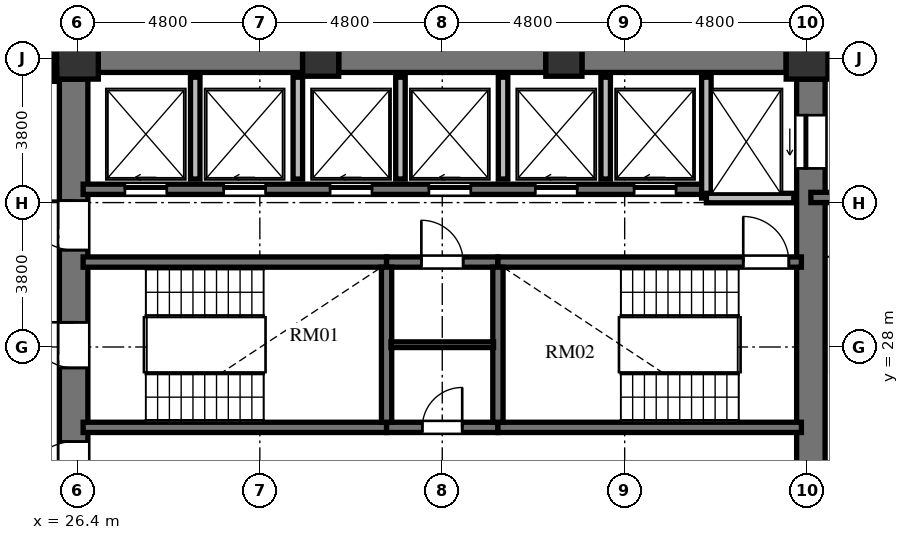
"""IFC4 building model, lengths in metres.
Left out: names, types, materials, properties, quantities, classifications, styles, units other than length and angle.
Written with IfcOpenShell. Run it as: python <this file> out.ifc"""

import sys

from ifc_helpers import new_model, si_unit, direction, frame, frame_2d, origin, origin_2d, place, context, subcontext, project, spatial, rectangle, extrude, element, fill, save


model = new_model("IFC4")
c1 = context("Model", 3, precision=1e-05, world=origin(), true_north=direction((0.0, 1.0)))
c2 = subcontext(c1, "Body", "Model", "MODEL_VIEW")
j1 = project(units=[si_unit("LENGTHUNIT", "METRE"), si_unit("PLANEANGLEUNIT", "RADIAN")], contexts=[c1])
p1 = place(None, origin())
s1 = spatial("IfcSite", under=j1, at=p1, CompositionType="ELEMENT")
p2 = place(p1, origin())
s2 = spatial("IfcBuilding", under=s1, at=p2, CompositionType="ELEMENT")
p3 = place(p2, frame((0.0, 0.0, 125.52)))
s3 = spatial("IfcBuildingStorey", under=s2, at=p3, CompositionType="ELEMENT", Elevation=125.52)
p4 = place(p3, frame((45.6, 35.6, 0.0), z_axis=(0.0, 0.0, 1.0), x_axis=(1.0, 0.0, 0.0)))
e1 = element("IfcColumn", 1, at=p4, inside=s3, PredefinedType="COLUMN", context=c2, shape_type="SweptSolid", body=[
    extrude(rectangle(XDim=1.1, YDim=1.1, at=origin_2d()), origin(), (0.0, 0.0, 1.0), 3.648),
])
for number, where, z_axis, x_axis in (
    (2, (39.2, 35.6, 0.0), (0.0, 0.0, 1.0), (1.0, 0.0, 0.0)),
    (3, (32.8, 35.6, 0.0), (0.0, 0.0, 1.0), (1.0, 0.0, 0.0)),
):
    element("IfcColumn", number, at=place(p3, frame(where, z_axis=z_axis, x_axis=x_axis)), inside=s3, PredefinedType="COLUMN", context=c2, shape_type="SweptSolid", body=[
        extrude(rectangle(XDim=0.95, YDim=0.95, at=origin_2d()), origin(), (0.0, 0.0, 1.0), 3.648),
    ])
p5 = place(p3, frame((26.4, 35.6, 0.0), z_axis=(0.0, 0.0, 1.0), x_axis=(1.0, 0.0, 0.0)))
e4 = element("IfcColumn", 4, at=p5, inside=s3, PredefinedType="COLUMN", context=c2, shape_type="SweptSolid", body=[
    extrude(rectangle(XDim=1.1, YDim=1.1, at=origin_2d()), origin(), (0.0, 0.0, 1.0), 3.648),
])
p6 = place(p3, frame((26.3, 20.95, 0.0), z_axis=(0.0, 0.0, 1.0), x_axis=(0.0, 1.0, 0.0)))
e5 = element("IfcWall", 5, at=p6, inside=s3, PredefinedType="SHEAR", context=c2, shape_type="SweptSolid", body=[
    extrude(rectangle(XDim=14.1, YDim=0.75, at=frame_2d((7.05, 0.0))), origin(), (0.0, 0.0, 1.0), 3.648),
])
p7 = place(p6, frame((6.5, 0.0, 0.0)))
e6 = element("IfcOpeningElement", 6, at=p7, cuts=e5, PredefinedType="OPENING", context=c2, shape_type="SweptSolid", body=[
    extrude(rectangle(XDim=1.2, YDim=2.15, at=frame_2d((0.6, 1.075))), frame((0.0, 0.385, 0.0), z_axis=(0.0, -1.0, 0.0), x_axis=(1.0, 0.0, 0.0)), (0.0, 0.0, 1.0), 0.77),
])
p8 = place(p6, frame((9.6, 0.0, 0.0)))
e7 = element("IfcOpeningElement", 7, at=p8, cuts=e5, PredefinedType="OPENING", context=c2, shape_type="SweptSolid", body=[
    extrude(rectangle(XDim=1.3, YDim=2.2, at=frame_2d((0.65, 1.1))), frame((0.0, 0.385, 0.0), z_axis=(0.0, -1.0, 0.0), x_axis=(1.0, 0.0, 0.0)), (0.0, 0.0, 1.0), 0.77),
])
p9 = place(p6, frame((3.26, 0.0, 0.0)))
e8 = element("IfcOpeningElement", 8, at=p9, cuts=e5, PredefinedType="OPENING", context=c2, shape_type="SweptSolid", body=[
    extrude(rectangle(XDim=1.3, YDim=2.2, at=frame_2d((0.65, 1.1))), frame((0.0, 0.385, 0.0), z_axis=(0.0, -1.0, 0.0), x_axis=(1.0, 0.0, 0.0)), (0.0, 0.0, 1.0), 0.77),
])
p10 = place(p3, frame((45.7, 20.95, 0.0), z_axis=(0.0, 0.0, 1.0), x_axis=(0.0, 1.0, 0.0)))
e9 = element("IfcWall", 9, at=p10, inside=s3, PredefinedType="SHEAR", context=c2, shape_type="SweptSolid", body=[
    extrude(rectangle(XDim=14.1, YDim=0.75, at=frame_2d((7.05, 0.0))), origin(), (0.0, 0.0, 1.0), 3.648),
])
p11 = place(p10, frame((11.75, 0.0, 0.0)))
e10 = element("IfcOpeningElement", 10, at=p11, cuts=e9, PredefinedType="OPENING", context=c2, shape_type="SweptSolid", body=[
    extrude(rectangle(XDim=1.4, YDim=2.3, at=frame_2d((0.7, 1.15))), frame((0.0, 0.385, 0.0), z_axis=(0.0, -1.0, 0.0), x_axis=(1.0, 0.0, 0.0)), (0.0, 0.0, 1.0), 0.77),
])
p12 = place(p10, frame((0.95, 0.0, 0.0)))
e11 = element("IfcOpeningElement", 11, at=p12, cuts=e9, PredefinedType="OPENING", context=c2, shape_type="SweptSolid", body=[
    extrude(rectangle(XDim=1.4, YDim=2.3, at=frame_2d((0.7, 1.15))), frame((0.0, 0.385, 0.0), z_axis=(0.0, -1.0, 0.0), x_axis=(1.0, 0.0, 0.0)), (0.0, 0.0, 1.0), 0.77),
])
p13 = place(p3, frame((26.95, 35.6, 0.0), z_axis=(0.0, 0.0, 1.0), x_axis=(1.0, 0.0, 0.0)))
e12 = element("IfcWall", 12, at=p13, inside=s3, PredefinedType="SHEAR", context=c2, shape_type="SweptSolid", body=[
    extrude(rectangle(XDim=5.375, YDim=0.75, at=frame_2d((2.688, 0.0))), origin(), (0.0, 0.0, 1.0), 3.648),
])
p14 = place(p3, frame((33.275, 35.6, 0.0), z_axis=(0.0, 0.0, 1.0), x_axis=(1.0, 0.0, 0.0)))
e13 = element("IfcWall", 13, at=p14, inside=s3, PredefinedType="SHEAR", context=c2, shape_type="SweptSolid", body=[
    extrude(rectangle(XDim=5.45, YDim=0.75, at=frame_2d((2.725, 0.0))), origin(), (0.0, 0.0, 1.0), 3.648),
])
p15 = place(p3, frame((39.675, 35.6, 0.0), z_axis=(0.0, 0.0, 1.0), x_axis=(1.0, 0.0, 0.0)))
e14 = element("IfcWall", 14, at=p15, inside=s3, PredefinedType="SHEAR", context=c2, shape_type="SweptSolid", body=[
    extrude(rectangle(XDim=5.375, YDim=0.75, at=frame_2d((2.688, 0.0))), origin(), (0.0, 0.0, 1.0), 3.648),
])
p16 = place(p3, frame((26.55, 30.235, 0.0), z_axis=(0.0, 0.0, 1.0), x_axis=(1.0, 0.0, 0.0)))
e15 = element("IfcWall", 15, at=p16, inside=s3, PredefinedType="SHEAR", context=c2, shape_type="SweptSolid", body=[
    extrude(rectangle(XDim=7.985, YDim=0.27, at=frame_2d((3.992, 0.0))), origin(), (0.0, 0.0, 1.0), 3.648),
])
p17 = place(p3, frame((34.535, 30.235, 0.0), z_axis=(0.0, 0.0, 1.0), x_axis=(1.0, 0.0, 0.0)))
e16 = element("IfcWall", 16, at=p17, inside=s3, PredefinedType="SHEAR", context=c2, shape_type="SweptSolid", body=[
    extrude(rectangle(XDim=2.93, YDim=0.27, at=frame_2d((1.465, 0.0))), origin(), (0.0, 0.0, 1.0), 3.648),
])
p18 = place(p17, frame((0.915, 0.0, 0.0)))
e17 = element("IfcOpeningElement", 17, at=p18, cuts=e16, PredefinedType="OPENING", context=c2, shape_type="SweptSolid", body=[
    extrude(rectangle(XDim=1.1, YDim=2.15, at=frame_2d((0.55, 1.075))), frame((0.0, 0.145, 0.0), z_axis=(0.0, -1.0, 0.0), x_axis=(1.0, 0.0, 0.0)), (0.0, 0.0, 1.0), 0.29),
])
p19 = place(p3, frame((37.465, 30.235, 0.0), z_axis=(0.0, 0.0, 1.0), x_axis=(1.0, 0.0, 0.0)))
e18 = element("IfcWall", 18, at=p19, inside=s3, PredefinedType="SHEAR", context=c2, shape_type="SweptSolid", body=[
    extrude(rectangle(XDim=7.985, YDim=0.27, at=frame_2d((3.992, 0.0))), origin(), (0.0, 0.0, 1.0), 3.648),
])
p20 = place(p19, frame((6.455, 0.0, 0.0)))
e19 = element("IfcOpeningElement", 19, at=p20, cuts=e18, PredefinedType="OPENING", context=c2, shape_type="SweptSolid", body=[
    extrude(rectangle(XDim=1.2, YDim=2.15, at=frame_2d((0.6, 1.075))), frame((0.0, 0.145, 0.0), z_axis=(0.0, -1.0, 0.0), x_axis=(1.0, 0.0, 0.0)), (0.0, 0.0, 1.0), 0.29),
])
p21 = place(p3, frame((26.55, 25.885, 0.0), z_axis=(0.0, 0.0, 1.0), x_axis=(1.0, 0.0, 0.0)))
e20 = element("IfcWall", 20, at=p21, inside=s3, PredefinedType="SHEAR", context=c2, shape_type="SweptSolid", body=[
    extrude(rectangle(XDim=7.985, YDim=0.27, at=frame_2d((3.992, 0.0))), origin(), (0.0, 0.0, 1.0), 3.648),
])
p22 = place(p3, frame((34.535, 25.885, 0.0), z_axis=(0.0, 0.0, 1.0), x_axis=(1.0, 0.0, 0.0)))
e21 = element("IfcWall", 21, at=p22, inside=s3, PredefinedType="SHEAR", context=c2, shape_type="SweptSolid", body=[
    extrude(rectangle(XDim=2.93, YDim=0.27, at=frame_2d((1.465, 0.0))), origin(), (0.0, 0.0, 1.0), 3.648),
])
p23 = place(p22, frame((0.94, 0.0, 0.0)))
e22 = element("IfcOpeningElement", 22, at=p23, cuts=e21, PredefinedType="OPENING", context=c2, shape_type="SweptSolid", body=[
    extrude(rectangle(XDim=1.05, YDim=2.15, at=frame_2d((0.525, 1.075))), frame((0.0, 0.145, 0.0), z_axis=(0.0, -1.0, 0.0), x_axis=(1.0, 0.0, 0.0)), (0.0, 0.0, 1.0), 0.29),
])
p24 = place(p3, frame((37.465, 25.885, 0.0), z_axis=(0.0, 0.0, 1.0), x_axis=(1.0, 0.0, 0.0)))
e23 = element("IfcWall", 23, at=p24, inside=s3, PredefinedType="SHEAR", context=c2, shape_type="SweptSolid", body=[
    extrude(rectangle(XDim=7.985, YDim=0.27, at=frame_2d((3.992, 0.0))), origin(), (0.0, 0.0, 1.0), 3.648),
])
for number, where, z_axis, x_axis in (
    (24, (34.535, 26.02, 0.0), (0.0, 0.0, 1.0), (0.0, 1.0, 0.0)),
    (25, (37.465, 26.02, 0.0), (0.0, 0.0, 1.0), (0.0, 1.0, 0.0)),
):
    element("IfcWall", number, at=place(p3, frame(where, z_axis=z_axis, x_axis=x_axis)), inside=s3, PredefinedType="SHEAR", context=c2, shape_type="SweptSolid", body=[
        extrude(rectangle(XDim=4.08, YDim=0.27, at=frame_2d((2.04, 0.0))), origin(), (0.0, 0.0, 1.0), 3.648),
    ])
p25 = place(p3, frame((34.65, 28.06, 0.0), z_axis=(0.0, 0.0, 1.0), x_axis=(1.0, 0.0, 0.0)))
e26 = element("IfcWall", 26, at=p25, inside=s3, PredefinedType="PARTITIONING", context=c2, shape_type="SweptSolid", body=[
    extrude(rectangle(XDim=2.7, YDim=0.15, at=frame_2d((1.35, 0.0))), origin(), (0.0, 0.0, 1.0), 3.428),
])
p26 = place(p3, frame((26.55, 32.15, 0.0), z_axis=(0.0, 0.0, 1.0), x_axis=(1.0, 0.0, 0.0)))
e27 = element("IfcWall", 27, at=p26, inside=s3, PredefinedType="SHEAR", context=c2, shape_type="SweptSolid", body=[
    extrude(rectangle(XDim=16.4, YDim=0.27, at=frame_2d((8.2, 0.0))), origin(), (0.0, 0.0, 1.0), 3.648),
])
p27 = place(p26, frame((1.1, 0.0, 0.0)))
e28 = element("IfcOpeningElement", 28, at=p27, cuts=e27, PredefinedType="OPENING", context=c2, shape_type="SweptSolid", body=[
    extrude(rectangle(XDim=1.1, YDim=2.2, at=frame_2d((0.55, 1.1))), frame((0.0, 0.145, 0.0), z_axis=(0.0, -1.0, 0.0), x_axis=(1.0, 0.0, 0.0)), (0.0, 0.0, 1.0), 0.29),
])
p28 = place(p26, frame((3.7, 0.0, 0.0)))
e29 = element("IfcOpeningElement", 29, at=p28, cuts=e27, PredefinedType="OPENING", context=c2, shape_type="SweptSolid", body=[
    extrude(rectangle(XDim=1.1, YDim=2.2, at=frame_2d((0.55, 1.1))), frame((0.0, 0.145, 0.0), z_axis=(0.0, -1.0, 0.0), x_axis=(1.0, 0.0, 0.0)), (0.0, 0.0, 1.0), 0.29),
])
p29 = place(p26, frame((6.5, 0.0, 0.0)))
e30 = element("IfcOpeningElement", 30, at=p29, cuts=e27, PredefinedType="OPENING", context=c2, shape_type="SweptSolid", body=[
    extrude(rectangle(XDim=1.1, YDim=2.2, at=frame_2d((0.55, 1.1))), frame((0.0, 0.145, 0.0), z_axis=(0.0, -1.0, 0.0), x_axis=(1.0, 0.0, 0.0)), (0.0, 0.0, 1.0), 0.29),
])
p30 = place(p26, frame((9.1, 0.0, 0.0)))
e31 = element("IfcOpeningElement", 31, at=p30, cuts=e27, PredefinedType="OPENING", context=c2, shape_type="SweptSolid", body=[
    extrude(rectangle(XDim=1.1, YDim=2.2, at=frame_2d((0.55, 1.1))), frame((0.0, 0.145, 0.0), z_axis=(0.0, -1.0, 0.0), x_axis=(1.0, 0.0, 0.0)), (0.0, 0.0, 1.0), 0.29),
])
p31 = place(p26, frame((11.9, 0.0, 0.0)))
e32 = element("IfcOpeningElement", 32, at=p31, cuts=e27, PredefinedType="OPENING", context=c2, shape_type="SweptSolid", body=[
    extrude(rectangle(XDim=1.1, YDim=2.2, at=frame_2d((0.55, 1.1))), frame((0.0, 0.145, 0.0), z_axis=(0.0, -1.0, 0.0), x_axis=(1.0, 0.0, 0.0)), (0.0, 0.0, 1.0), 0.29),
])
p32 = place(p26, frame((14.5, 0.0, 0.0)))
e33 = element("IfcOpeningElement", 33, at=p32, cuts=e27, PredefinedType="OPENING", context=c2, shape_type="SweptSolid", body=[
    extrude(rectangle(XDim=1.1, YDim=2.2, at=frame_2d((0.55, 1.1))), frame((0.0, 0.145, 0.0), z_axis=(0.0, -1.0, 0.0), x_axis=(1.0, 0.0, 0.0)), (0.0, 0.0, 1.0), 0.29),
])
p33 = place(p3, frame((42.95, 31.92, 0.0), z_axis=(0.0, 0.0, 1.0), x_axis=(0.0, 1.0, 0.0)))
e34 = element("IfcWall", 34, at=p33, inside=s3, PredefinedType="SOLIDWALL", context=c2, shape_type="SweptSolid", body=[
    extrude(rectangle(XDim=3.18, YDim=0.25, at=frame_2d((1.59, 0.0))), origin(), (0.0, 0.0, 1.0), 3.428),
])
p34 = place(p3, frame((42.95, 31.92, 0.0), z_axis=(0.0, 0.0, 1.0), x_axis=(1.0, 0.0, 0.0)))
e35 = element("IfcWall", 35, at=p34, inside=s3, PredefinedType="SOLIDWALL", context=c2, shape_type="SweptSolid", body=[
    extrude(rectangle(XDim=2.3, YDim=0.25, at=frame_2d((1.15, 0.0))), origin(), (0.0, 0.0, 1.0), 3.428),
])
for number, where, z_axis, x_axis in (
    (36, (29.5, 32.42, 0.0), (0.0, 0.0, 1.0), (0.0, 1.0, 0.0)),
    (37, (32.2, 32.42, 0.0), (0.0, 0.0, 1.0), (0.0, 1.0, 0.0)),
    (38, (34.9, 32.42, 0.0), (0.0, 0.0, 1.0), (0.0, 1.0, 0.0)),
    (39, (37.6, 32.42, 0.0), (0.0, 0.0, 1.0), (0.0, 1.0, 0.0)),
    (40, (40.3, 32.42, 0.0), (0.0, 0.0, 1.0), (0.0, 1.0, 0.0)),
):
    element("IfcWall", number, at=place(p3, frame(where, z_axis=z_axis, x_axis=x_axis)), inside=s3, PredefinedType="SOLIDWALL", context=c2, shape_type="SweptSolid", body=[
        extrude(rectangle(XDim=2.68, YDim=0.25, at=frame_2d((1.34, 0.0))), origin(), (0.0, 0.0, 1.0), 3.428),
    ])
p35 = place(p3, frame((45.7, 31.935, 0.0), z_axis=(0.0, 0.0, 1.0), x_axis=(1.0, 0.0, 0.0)))
e41 = element("IfcWall", 41, at=p35, inside=s3, PredefinedType="SHEAR", context=c2, shape_type="SweptSolid", body=[
    extrude(rectangle(XDim=4.715, YDim=0.27, at=frame_2d((2.357, 0.0))), origin(), (0.0, 0.0, 1.0), 3.648),
])
p36 = place(p3, frame((25.83, 36.21, 0.0), z_axis=(0.0, 0.0, 1.0), x_axis=(0.0, -1.0, 0.0)))
e42 = element("IfcWall", 42, at=p36, inside=s3, PredefinedType="PARTITIONING", context=c2, shape_type="SweptSolid", body=[
    extrude(rectangle(XDim=1.22, YDim=0.18, at=frame_2d((0.61, 0.0))), origin(), (0.0, 0.0, 1.0), 3.428),
])
p37 = place(p7, origin())
e43 = element("IfcDoor", 43, at=p37, inside=s3, OperationType="SINGLE_SWING_RIGHT", PredefinedType="DOOR", context=c2, shape_type="SweptSolid", body=[
    extrude(rectangle(XDim=1.2, YDim=2.15, at=frame_2d((0.6, 1.075))), frame((0.0, 0.025, 0.0), z_axis=(0.0, -1.0, 0.0), x_axis=(1.0, 0.0, 0.0)), (0.0, 0.0, 1.0), 0.05),
])
fill(e6, e43)
p38 = place(p20, origin())
e44 = element("IfcDoor", 44, at=p38, inside=s3, OperationType="SINGLE_SWING_LEFT", PredefinedType="DOOR", context=c2, shape_type="SweptSolid", body=[
    extrude(rectangle(XDim=1.2, YDim=2.15, at=frame_2d((0.6, 1.075))), frame((0.0, 0.025, 0.0), z_axis=(0.0, -1.0, 0.0), x_axis=(1.0, 0.0, 0.0)), (0.0, 0.0, 1.0), 0.05),
])
fill(e19, e44)
p39 = place(p23, origin())
e45 = element("IfcDoor", 45, at=p39, inside=s3, OperationType="SINGLE_SWING_RIGHT", PredefinedType="DOOR", context=c2, shape_type="SweptSolid", body=[
    extrude(rectangle(XDim=1.05, YDim=2.15, at=frame_2d((0.525, 1.075))), frame((0.0, 0.025, 0.0), z_axis=(0.0, -1.0, 0.0), x_axis=(1.0, 0.0, 0.0)), (0.0, 0.0, 1.0), 0.05),
])
fill(e22, e45)
p40 = place(p18, origin())
e46 = element("IfcDoor", 46, at=p40, inside=s3, OperationType="SINGLE_SWING_LEFT", PredefinedType="DOOR", context=c2, shape_type="SweptSolid", body=[
    extrude(rectangle(XDim=1.1, YDim=2.15, at=frame_2d((0.55, 1.075))), frame((0.0, 0.025, 0.0), z_axis=(0.0, -1.0, 0.0), x_axis=(1.0, 0.0, 0.0)), (0.0, 0.0, 1.0), 0.05),
])
fill(e17, e46)
p41 = place(p8, origin())
e47 = element("IfcDoor", 47, at=p41, inside=s3, OperationType="SINGLE_SWING_RIGHT", PredefinedType="DOOR", context=c2, shape_type="SweptSolid", body=[
    extrude(rectangle(XDim=1.3, YDim=2.2, at=frame_2d((0.65, 1.1))), frame((0.0, 0.025, 0.0), z_axis=(0.0, -1.0, 0.0), x_axis=(1.0, 0.0, 0.0)), (0.0, 0.0, 1.0), 0.05),
])
fill(e7, e47)
p42 = place(p9, origin())
e48 = element("IfcDoor", 48, at=p42, inside=s3, OperationType="SINGLE_SWING_LEFT", PredefinedType="DOOR", context=c2, shape_type="SweptSolid", body=[
    extrude(rectangle(XDim=1.3, YDim=2.2, at=frame_2d((0.65, 1.1))), frame((0.0, 0.025, 0.0), z_axis=(0.0, -1.0, 0.0), x_axis=(1.0, 0.0, 0.0)), (0.0, 0.0, 1.0), 0.05),
])
fill(e8, e48)
p43 = place(p27, origin())
e49 = element("IfcDoor", 49, at=p43, inside=s3, OperationType="SLIDING_TO_LEFT", PredefinedType="DOOR", context=c2, shape_type="SweptSolid", body=[
    extrude(rectangle(XDim=1.1, YDim=2.2, at=frame_2d((0.55, 1.1))), frame((0.0, 0.025, 0.0), z_axis=(0.0, -1.0, 0.0), x_axis=(1.0, 0.0, 0.0)), (0.0, 0.0, 1.0), 0.05),
])
fill(e28, e49)
p44 = place(p28, origin())
e50 = element("IfcDoor", 50, at=p44, inside=s3, OperationType="SLIDING_TO_LEFT", PredefinedType="DOOR", context=c2, shape_type="SweptSolid", body=[
    extrude(rectangle(XDim=1.1, YDim=2.2, at=frame_2d((0.55, 1.1))), frame((0.0, 0.025, 0.0), z_axis=(0.0, -1.0, 0.0), x_axis=(1.0, 0.0, 0.0)), (0.0, 0.0, 1.0), 0.05),
])
fill(e29, e50)
p45 = place(p29, origin())
e51 = element("IfcDoor", 51, at=p45, inside=s3, OperationType="SLIDING_TO_LEFT", PredefinedType="DOOR", context=c2, shape_type="SweptSolid", body=[
    extrude(rectangle(XDim=1.1, YDim=2.2, at=frame_2d((0.55, 1.1))), frame((0.0, 0.025, 0.0), z_axis=(0.0, -1.0, 0.0), x_axis=(1.0, 0.0, 0.0)), (0.0, 0.0, 1.0), 0.05),
])
fill(e30, e51)
p46 = place(p30, origin())
e52 = element("IfcDoor", 52, at=p46, inside=s3, OperationType="SLIDING_TO_LEFT", PredefinedType="DOOR", context=c2, shape_type="SweptSolid", body=[
    extrude(rectangle(XDim=1.1, YDim=2.2, at=frame_2d((0.55, 1.1))), frame((0.0, 0.025, 0.0), z_axis=(0.0, -1.0, 0.0), x_axis=(1.0, 0.0, 0.0)), (0.0, 0.0, 1.0), 0.05),
])
fill(e31, e52)
p47 = place(p31, origin())
e53 = element("IfcDoor", 53, at=p47, inside=s3, OperationType="SLIDING_TO_LEFT", PredefinedType="DOOR", context=c2, shape_type="SweptSolid", body=[
    extrude(rectangle(XDim=1.1, YDim=2.2, at=frame_2d((0.55, 1.1))), frame((0.0, 0.025, 0.0), z_axis=(0.0, -1.0, 0.0), x_axis=(1.0, 0.0, 0.0)), (0.0, 0.0, 1.0), 0.05),
])
fill(e32, e53)
p48 = place(p32, origin())
e54 = element("IfcDoor", 54, at=p48, inside=s3, OperationType="SLIDING_TO_LEFT", PredefinedType="DOOR", context=c2, shape_type="SweptSolid", body=[
    extrude(rectangle(XDim=1.1, YDim=2.2, at=frame_2d((0.55, 1.1))), frame((0.0, 0.025, 0.0), z_axis=(0.0, -1.0, 0.0), x_axis=(1.0, 0.0, 0.0)), (0.0, 0.0, 1.0), 0.05),
])
fill(e33, e54)
p49 = place(p11, origin())
e55 = element("IfcDoor", 55, at=p49, inside=s3, OperationType="SLIDING_TO_LEFT", PredefinedType="DOOR", context=c2, shape_type="SweptSolid", body=[
    extrude(rectangle(XDim=1.4, YDim=2.3, at=frame_2d((0.7, 1.15))), frame((0.0, 0.025, 0.0), z_axis=(0.0, -1.0, 0.0), x_axis=(1.0, 0.0, 0.0)), (0.0, 0.0, 1.0), 0.05),
])
fill(e10, e55)
save(model, sys.argv[1])
